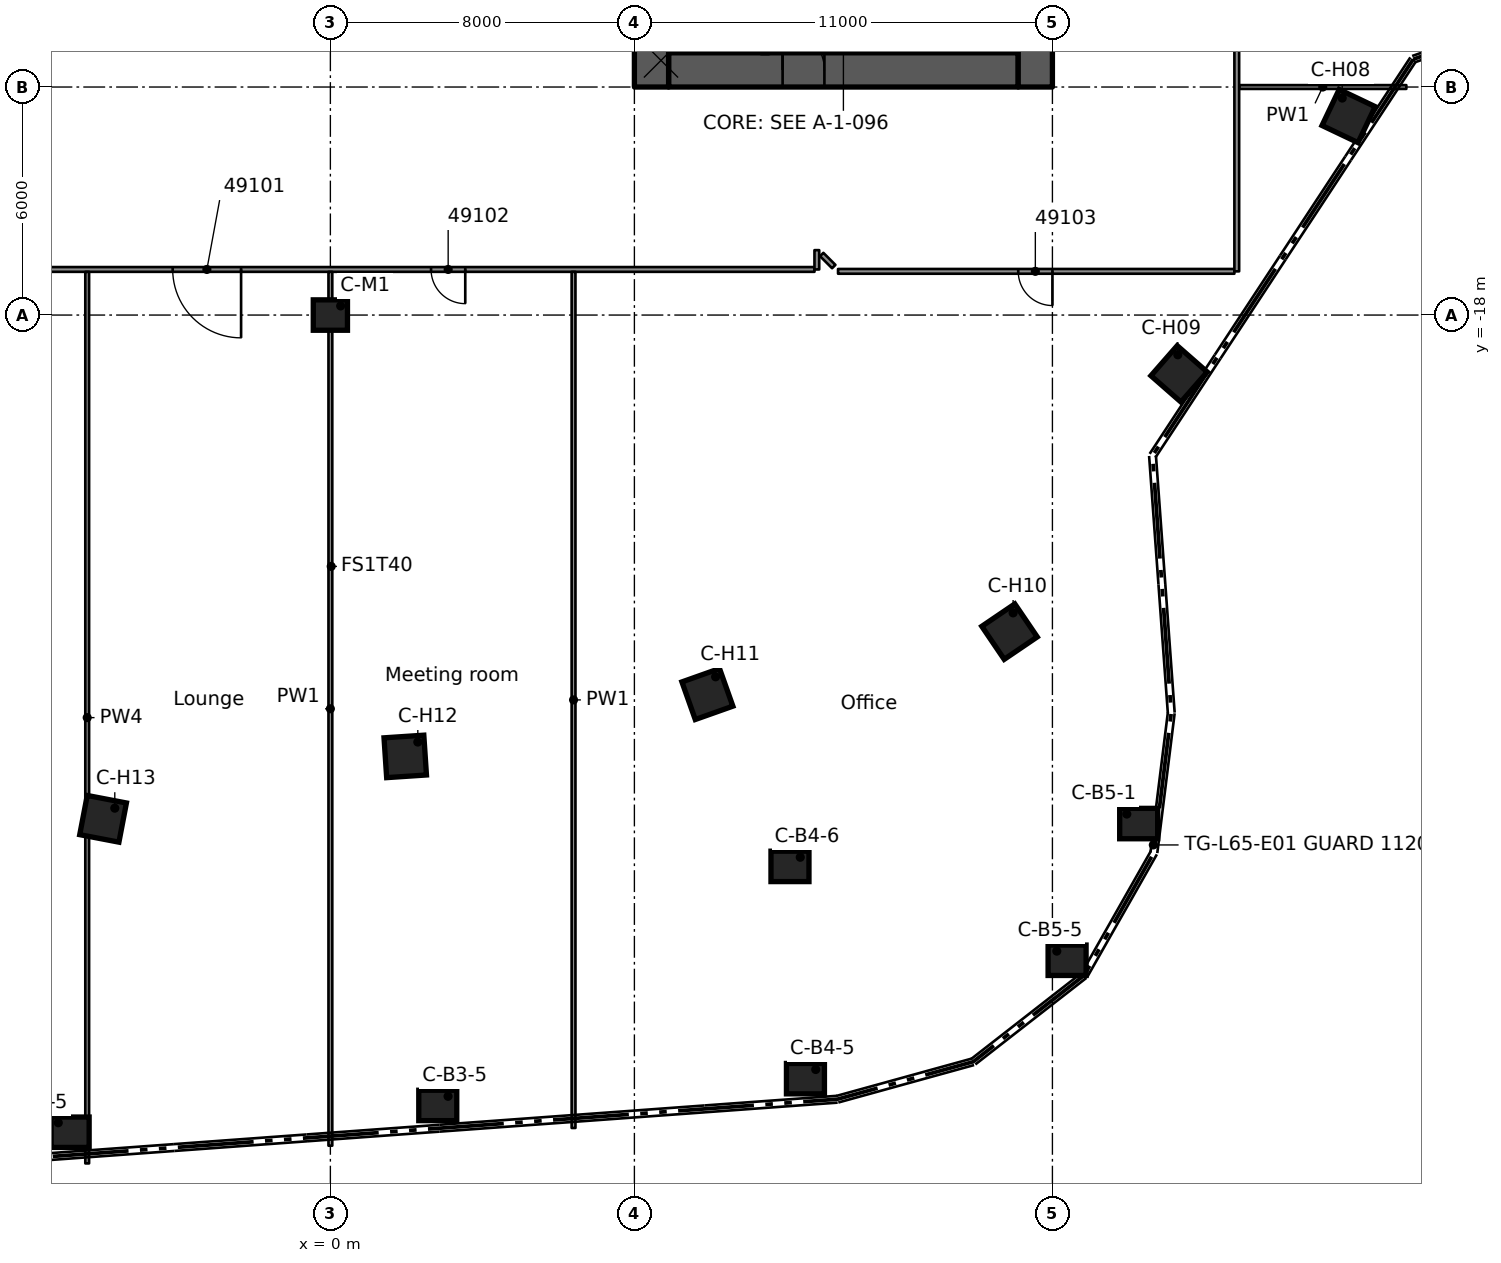
"""IFC4 building model, lengths in metres.
Left out: names, types, materials, properties, quantities, classifications, styles, units other than length and angle.
Written with IfcOpenShell. Run it as: python <this file> out.ifc"""

import sys

from ifc_helpers import new_model, si_unit, direction, frame, frame_2d, origin, origin_2d, place, context, subcontext, project, spatial, rectangle, extrude, element, fill, save


model = new_model("IFC4")
c1 = context("Model", 3, precision=1e-05, world=origin(), true_north=direction((0.0, 1.0)))
c2 = subcontext(c1, "Body", "Model", "MODEL_VIEW")
j1 = project(units=[si_unit("LENGTHUNIT", "METRE"), si_unit("PLANEANGLEUNIT", "RADIAN")], contexts=[c1])
p1 = place(None, origin())
s1 = spatial("IfcSite", under=j1, at=p1, CompositionType="ELEMENT")
p2 = place(p1, origin())
s2 = spatial("IfcBuilding", under=s1, at=p2, CompositionType="ELEMENT")
p3 = place(p2, frame((0.0, 0.0, 246.0)))
s3 = spatial("IfcBuildingStorey", under=s2, at=p3, CompositionType="ELEMENT", Elevation=246.0)
p4 = place(p3, frame((8.9, -11.55, 0.0), z_axis=(0.0, 0.0, 1.0), x_axis=(1.0, 0.0, 0.0)))
e1 = element("IfcWall", 1, at=p4, inside=s3, PredefinedType="SHEAR", context=c2, shape_type="SweptSolid", body=[
    extrude(rectangle(XDim=9.2, YDim=0.9, at=frame_2d((4.6, 0.0))), origin(), (0.0, 0.0, 1.0), 3.5),
])
p5 = place(p4, frame((3.0, 0.0, 0.0)))
e2 = element("IfcOpeningElement", 2, at=p5, cuts=e1, PredefinedType="OPENING", context=c2, shape_type="SweptSolid", body=[
    extrude(rectangle(XDim=1.1, YDim=2.1, at=frame_2d((0.55, 1.05))), frame((0.0, 0.46, 0.0), z_axis=(0.0, -1.0, 0.0), x_axis=(1.0, 0.0, 0.0)), (0.0, 0.0, 1.0), 0.92),
])
p6 = place(p3, frame((8.45, -12.0, 0.0), z_axis=(0.0, 0.0, 1.0), x_axis=(0.0, 1.0, 0.0)))
e3 = element("IfcWall", 3, at=p6, inside=s3, PredefinedType="SHEAR", context=c2, shape_type="SweptSolid", body=[
    extrude(rectangle(XDim=24.0, YDim=0.9, at=frame_2d((12.0, 0.0))), origin(), (0.0, 0.0, 1.0), 3.5),
])
p7 = place(p6, frame((12.6, 0.0, 0.0)))
e4 = element("IfcOpeningElement", 4, at=p7, cuts=e3, PredefinedType="OPENING", context=c2, shape_type="SweptSolid", body=[
    extrude(rectangle(XDim=1.8, YDim=2.1, at=frame_2d((0.9, 1.05))), frame((0.0, 0.46, 0.0), z_axis=(0.0, -1.0, 0.0), x_axis=(1.0, 0.0, 0.0)), (0.0, 0.0, 1.0), 0.92),
])
p8 = place(p6, frame((3.25, 0.0, 0.0)))
e5 = element("IfcOpeningElement", 5, at=p8, cuts=e3, PredefinedType="OPENING", context=c2, shape_type="SweptSolid", body=[
    extrude(rectangle(XDim=1.1, YDim=2.1, at=frame_2d((0.55, 1.05))), frame((0.0, 0.46, 0.0), z_axis=(0.0, -1.0, 0.0), x_axis=(1.0, 0.0, 0.0)), (0.0, 0.0, 1.0), 0.92),
])
p9 = place(p3, frame((18.55, -12.0, 0.0), z_axis=(0.0, 0.0, 1.0), x_axis=(0.0, 1.0, 0.0)))
e6 = element("IfcWall", 6, at=p9, inside=s3, PredefinedType="SHEAR", context=c2, shape_type="SweptSolid", body=[
    extrude(rectangle(XDim=24.0, YDim=0.9, at=frame_2d((12.0, 0.0))), origin(), (0.0, 0.0, 1.0), 3.5),
])
p10 = place(p9, frame((12.1, 0.0, 0.0)))
e7 = element("IfcOpeningElement", 7, at=p10, cuts=e6, PredefinedType="OPENING", context=c2, shape_type="SweptSolid", body=[
    extrude(rectangle(XDim=1.8, YDim=2.1, at=frame_2d((0.9, 1.05))), frame((0.0, 0.46, 0.0), z_axis=(0.0, -1.0, 0.0), x_axis=(1.0, 0.0, 0.0)), (0.0, 0.0, 1.0), 0.92),
])
for number, where, z_axis, x_axis in (
    (8, (-6.848, -39.502, 0.0), (0.0, 0.0, 1.0), (1.0, 0.0, 0.0)),
    (9, (2.826, -38.797, 0.0), (0.0, 0.0, 1.0), (1.0, 0.0, 0.0)),
    (10, (12.501, -38.092, 0.0), (0.0, 0.0, 1.0), (1.0, 0.0, 0.0)),
    (11, (12.094, -32.507, 0.0), (0.0, 0.0, 1.0), (1.0, 0.0, 0.0)),
    (12, (21.27, -31.38, 0.0), (0.0, 0.0, 1.0), (1.0, 0.0, 0.0)),
    (13, (19.386, -34.977, 0.0), (0.0, 0.0, 1.0), (1.0, 0.0, 0.0)),
):
    element("IfcColumn", number, at=place(p3, frame(where, z_axis=z_axis, x_axis=x_axis)), inside=s3, PredefinedType="COLUMN", context=c2, shape_type="SweptSolid", body=[
        extrude(rectangle(XDim=1.0, YDim=0.8, at=origin_2d()), origin(), (0.0, 0.0, 1.0), 3.5),
    ])
for number, where, z_axis, x_axis in (
    (14, (26.794, -12.764, 0.0), (0.0, 0.0, 1.0), (0.903, -0.43, 0.0)),
    (15, (22.333, -19.547, 0.0), (0.0, 0.0, 1.0), (0.752, -0.659, 0.0)),
    (16, (17.871, -26.33, 0.0), (0.0, 0.0, 1.0), (0.562, -0.827, 0.0)),
    (17, (9.921, -27.972, 0.0), (0.0, 0.0, 1.0), (0.334, -0.942, 0.0)),
    (18, (1.97, -29.613, 0.0), (0.0, 0.0, 1.0), (0.066, -0.998, 0.0)),
    (19, (-5.981, -31.255, 0.0), (0.0, 0.0, 1.0), (-0.188, -0.982, 0.0)),
):
    element("IfcColumn", number, at=place(p3, frame(where, z_axis=z_axis, x_axis=x_axis)), inside=s3, PredefinedType="COLUMN", context=c2, shape_type="SweptSolid", body=[
        extrude(rectangle(XDim=1.05, YDim=1.05, at=origin_2d()), origin(), (0.0, 0.0, 1.0), 3.5),
    ])
p11 = place(p3, frame((0.0, -18.0, 0.0), z_axis=(0.0, 0.0, 1.0), x_axis=(1.0, 0.0, 0.0)))
e20 = element("IfcColumn", 20, at=p11, inside=s3, PredefinedType="COLUMN", context=c2, shape_type="SweptSolid", body=[
    extrude(rectangle(XDim=0.9, YDim=0.8, at=origin_2d()), origin(), (0.0, 0.0, 1.0), 3.5),
])
p12 = place(p3, frame((11.44, -6.975, 0.0), z_axis=(0.0, 0.0, 1.0), x_axis=(0.0, -1.0, 0.0)))
e21 = element("IfcWall", 21, at=p12, inside=s3, PredefinedType="SOLIDWALL", context=c2, shape_type="SweptSolid", body=[
    extrude(rectangle(XDim=4.125, YDim=0.2, at=frame_2d((2.062, 0.0))), origin(), (0.0, 0.0, 1.0), 3.08),
])
p13 = place(p12, frame((2.1, 0.0, 0.0)))
e22 = element("IfcOpeningElement", 22, at=p13, cuts=e21, PredefinedType="OPENING", context=c2, shape_type="SweptSolid", body=[
    extrude(rectangle(XDim=1.1, YDim=2.1, at=frame_2d((0.55, 1.05))), frame((0.0, 0.11, 0.0), z_axis=(0.0, -1.0, 0.0), x_axis=(1.0, 0.0, 0.0)), (0.0, 0.0, 1.0), 0.22),
])
p14 = place(p3, frame((12.929, -16.407, 0.0), z_axis=(0.0, 0.0, 1.0), x_axis=(0.707106781187, -0.707106781187, 0.0)))
e23 = element("IfcWall", 23, at=p14, inside=s3, PredefinedType="PARTITIONING", context=c2, shape_type="SweptSolid", body=[
    extrude(rectangle(XDim=0.448, YDim=0.125, at=frame_2d((0.224, 0.0))), origin(), (0.0, 0.0, 1.0), 3.06),
])
p15 = place(p3, frame((23.788, -16.85, 0.0), z_axis=(0.0, 0.0, 1.0), x_axis=(-1.0, 0.0, 0.0)))
e24 = element("IfcWall", 24, at=p15, inside=s3, PredefinedType="PARTITIONING", context=c2, shape_type="SweptSolid", body=[
    extrude(rectangle(XDim=10.429, YDim=0.125, at=frame_2d((5.215, 0.0))), origin(), (0.0, 0.0, 1.0), 3.06),
])
p16 = place(p15, frame((4.788, 0.0, 0.0)))
e25 = element("IfcOpeningElement", 25, at=p16, cuts=e24, PredefinedType="OPENING", context=c2, shape_type="SweptSolid", body=[
    extrude(rectangle(XDim=0.9, YDim=2.1, at=frame_2d((0.45, 1.05))), frame((0.0, 0.073, 0.0), z_axis=(0.0, -1.0, 0.0), x_axis=(1.0, 0.0, 0.0)), (0.0, 0.0, 1.0), 0.145),
])
p17 = place(p3, frame((12.739, -16.8, 0.0), z_axis=(0.0, 0.0, 1.0), x_axis=(-1.0, 0.0, 0.0)))
e26 = element("IfcWall", 26, at=p17, inside=s3, PredefinedType="PARTITIONING", context=c2, shape_type="SweptSolid", body=[
    extrude(rectangle(XDim=25.478, YDim=0.125, at=frame_2d((12.739, 0.0))), origin(), (0.0, 0.0, 1.0), 3.06),
])
p18 = place(p17, frame((15.088, 0.0, 0.0)))
e27 = element("IfcOpeningElement", 27, at=p18, cuts=e26, PredefinedType="OPENING", context=c2, shape_type="SweptSolid", body=[
    extrude(rectangle(XDim=1.8, YDim=2.1, at=frame_2d((0.9, 1.05))), frame((0.0, 0.073, 0.0), z_axis=(0.0, -1.0, 0.0), x_axis=(1.0, 0.0, 0.0)), (0.0, 0.0, 1.0), 0.145),
])
p19 = place(p17, frame((9.189, 0.0, 0.0)))
e28 = element("IfcOpeningElement", 28, at=p19, cuts=e26, PredefinedType="OPENING", context=c2, shape_type="SweptSolid", body=[
    extrude(rectangle(XDim=0.9, YDim=2.1, at=frame_2d((0.45, 1.05))), frame((0.0, 0.073, 0.0), z_axis=(0.0, -1.0, 0.0), x_axis=(1.0, 0.0, 0.0)), (0.0, 0.0, 1.0), 0.145),
])
p20 = place(p3, frame((23.913, -12.0, 0.0), z_axis=(0.0, 0.0, 1.0), x_axis=(1.0, 0.0, 0.0)))
e29 = element("IfcWall", 29, at=p20, inside=s3, PredefinedType="PARTITIONING", context=c2, shape_type="SweptSolid", body=[
    extrude(rectangle(XDim=4.4, YDim=0.1, at=frame_2d((2.2, 0.0))), origin(), (0.0, 0.0, 1.0), 3.06),
])
p21 = place(p3, frame((23.851, 16.85, 0.0), z_axis=(0.0, 0.0, 1.0), x_axis=(0.0, -1.0, 0.0)))
e30 = element("IfcWall", 30, at=p21, inside=s3, PredefinedType="PARTITIONING", context=c2, shape_type="SweptSolid", body=[
    extrude(rectangle(XDim=33.7, YDim=0.125, at=frame_2d((16.85, 0.0))), origin(), (0.0, 0.0, 1.0), 3.06),
])
p22 = place(p21, frame((21.95, 0.0, 0.0)))
e31 = element("IfcOpeningElement", 31, at=p22, cuts=e30, PredefinedType="OPENING", context=c2, shape_type="SweptSolid", body=[
    extrude(rectangle(XDim=1.8, YDim=2.1, at=frame_2d((0.9, 1.05))), frame((0.0, 0.073, 0.0), z_axis=(0.0, -1.0, 0.0), x_axis=(1.0, 0.0, 0.0)), (0.0, 0.0, 1.0), 0.145),
])
p23 = place(p21, frame((17.7, 0.0, 0.0)))
e32 = element("IfcOpeningElement", 32, at=p23, cuts=e30, PredefinedType="OPENING", context=c2, shape_type="SweptSolid", body=[
    extrude(rectangle(XDim=1.8, YDim=2.1, at=frame_2d((0.9, 1.05))), frame((0.0, 0.073, 0.0), z_axis=(0.0, -1.0, 0.0), x_axis=(1.0, 0.0, 0.0)), (0.0, 0.0, 1.0), 0.145),
])
p24 = place(p21, frame((10.45, 0.0, 0.0)))
e33 = element("IfcOpeningElement", 33, at=p24, cuts=e30, PredefinedType="OPENING", context=c2, shape_type="SweptSolid", body=[
    extrude(rectangle(XDim=0.9, YDim=2.1, at=frame_2d((0.45, 1.05))), frame((0.0, 0.073, 0.0), z_axis=(0.0, -1.0, 0.0), x_axis=(1.0, 0.0, 0.0)), (0.0, 0.0, 1.0), 0.145),
])
p25 = place(p21, frame((2.1, 0.0, 0.0)))
e34 = element("IfcOpeningElement", 34, at=p25, cuts=e30, PredefinedType="OPENING", context=c2, shape_type="SweptSolid", body=[
    extrude(rectangle(XDim=0.9, YDim=2.1, at=frame_2d((0.45, 1.05))), frame((0.0, 0.073, 0.0), z_axis=(0.0, -1.0, 0.0), x_axis=(1.0, 0.0, 0.0)), (0.0, 0.0, 1.0), 0.145),
])
p26 = place(p3, frame((12.801, -16.8, 0.0), z_axis=(0.0, 0.0, 1.0), x_axis=(0.0, 1.0, 0.0)))
e35 = element("IfcWall", 35, at=p26, inside=s3, PredefinedType="PARTITIONING", context=c2, shape_type="SweptSolid", body=[
    extrude(rectangle(XDim=0.508, YDim=0.125, at=frame_2d((0.254, 0.0))), origin(), (0.0, 0.0, 1.0), 3.06),
])
p27 = place(p3, frame((6.399, -39.39, 0.0), z_axis=(0.0, 0.0, 1.0), x_axis=(0.0, 1.0, 0.0)))
e36 = element("IfcWall", 36, at=p27, inside=s3, PredefinedType="PARTITIONING", context=c2, shape_type="SweptSolid", body=[
    extrude(rectangle(XDim=22.527, YDim=0.1, at=frame_2d((11.263, 0.0))), origin(), (0.0, 0.0, 1.0), 3.06),
])
p28 = place(p3, frame((0.0, -39.856, 0.0), z_axis=(0.0, 0.0, 1.0), x_axis=(0.0, 1.0, 0.0)))
e37 = element("IfcWall", 37, at=p28, inside=s3, PredefinedType="PARTITIONING", context=c2, shape_type="SweptSolid", body=[
    extrude(rectangle(XDim=22.993, YDim=0.1, at=frame_2d((11.497, 0.0))), origin(), (0.0, 0.0, 1.0), 3.06),
])
p29 = place(p3, frame((-6.399, -40.322, 0.0), z_axis=(0.0, 0.0, 1.0), x_axis=(0.0, 1.0, 0.0)))
e38 = element("IfcWall", 38, at=p29, inside=s3, PredefinedType="PARTITIONING", context=c2, shape_type="SweptSolid", body=[
    extrude(rectangle(XDim=23.459, YDim=0.1, at=frame_2d((11.729, 0.0))), origin(), (0.0, 0.0, 1.0), 2.425),
])
p30 = place(p5, origin())
e39 = element("IfcDoor", 39, at=p30, inside=s3, OperationType="SINGLE_SWING_LEFT", PredefinedType="DOOR", context=c2, shape_type="SweptSolid", body=[
    extrude(rectangle(XDim=1.1, YDim=2.1, at=frame_2d((0.55, 1.05))), frame((0.0, 0.025, 0.0), z_axis=(0.0, -1.0, 0.0), x_axis=(1.0, 0.0, 0.0)), (0.0, 0.0, 1.0), 0.05),
])
fill(e2, e39)
p31 = place(p18, origin())
e40 = element("IfcDoor", 40, at=p31, inside=s3, OperationType="DOUBLE_DOOR_SINGLE_SWING", PredefinedType="DOOR", context=c2, shape_type="SweptSolid", body=[
    extrude(rectangle(XDim=1.8, YDim=2.1, at=frame_2d((0.9, 1.05))), frame((0.0, 0.025, 0.0), z_axis=(0.0, -1.0, 0.0), x_axis=(1.0, 0.0, 0.0)), (0.0, 0.0, 1.0), 0.05),
])
fill(e27, e40)
p32 = place(p19, origin())
e41 = element("IfcDoor", 41, at=p32, inside=s3, OperationType="SINGLE_SWING_LEFT", PredefinedType="DOOR", context=c2, shape_type="SweptSolid", body=[
    extrude(rectangle(XDim=0.9, YDim=2.1, at=frame_2d((0.45, 1.05))), frame((0.0, 0.025, 0.0), z_axis=(0.0, -1.0, 0.0), x_axis=(1.0, 0.0, 0.0)), (0.0, 0.0, 1.0), 0.05),
])
fill(e28, e41)
p33 = place(p16, origin())
e42 = element("IfcDoor", 42, at=p33, inside=s3, OperationType="SINGLE_SWING_RIGHT", PredefinedType="DOOR", context=c2, shape_type="SweptSolid", body=[
    extrude(rectangle(XDim=0.9, YDim=2.1, at=frame_2d((0.45, 1.05))), frame((0.0, 0.025, 0.0), z_axis=(0.0, -1.0, 0.0), x_axis=(1.0, 0.0, 0.0)), (0.0, 0.0, 1.0), 0.05),
])
fill(e25, e42)
save(model, sys.argv[1])
